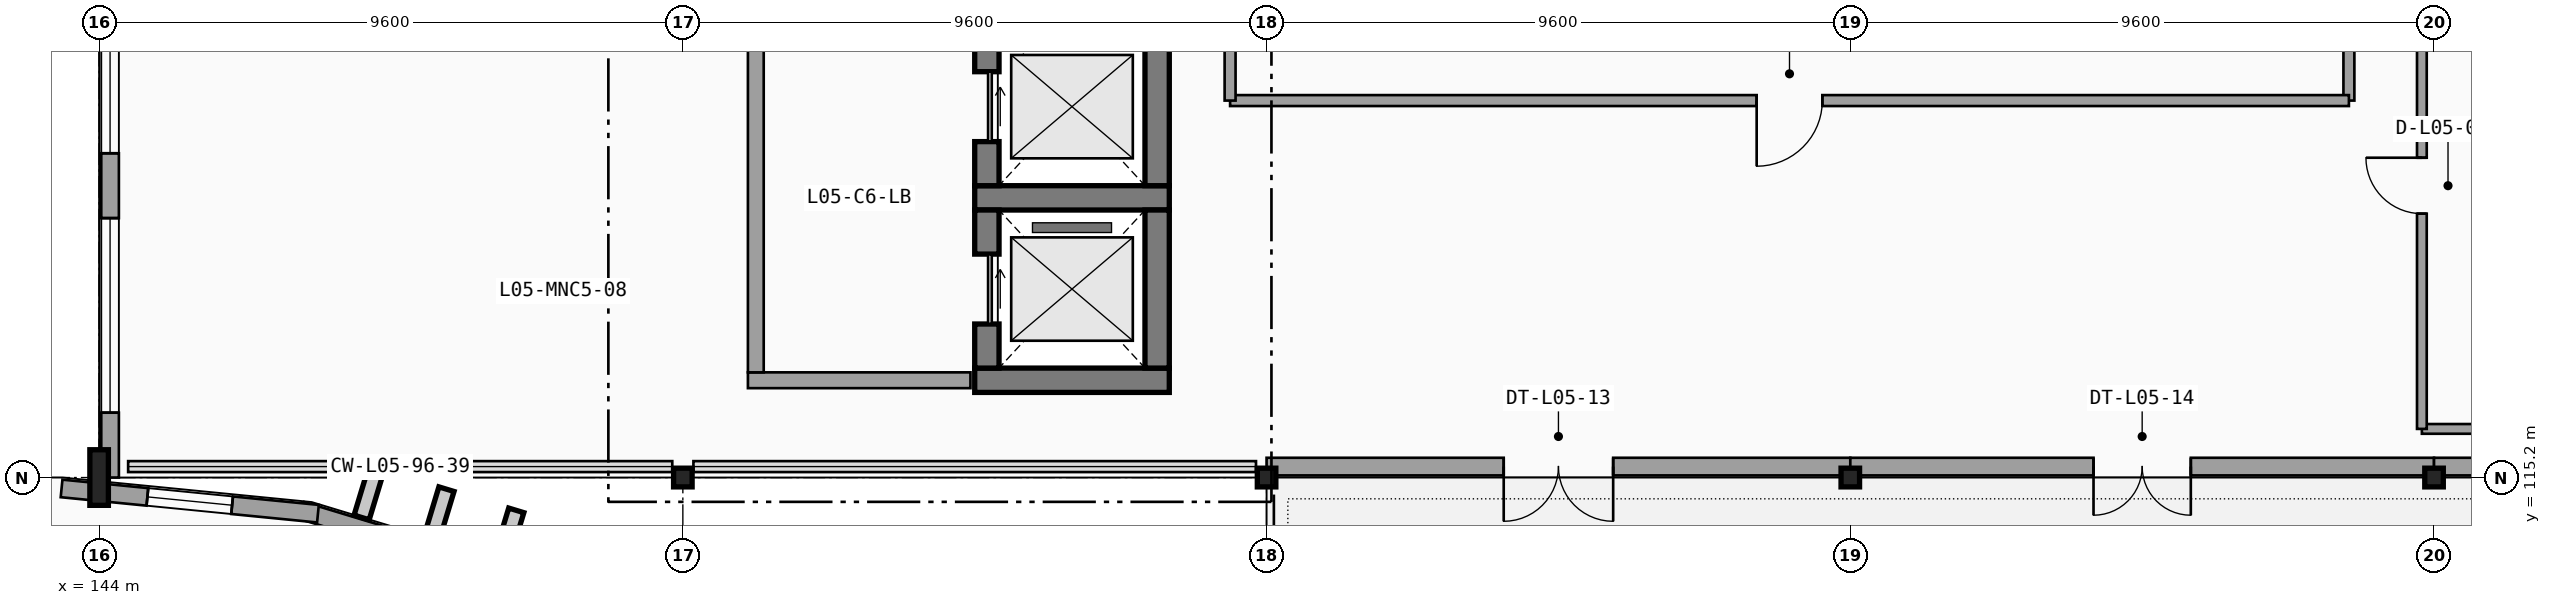
"""IFC4 building model, lengths in metres.
Left out: names, types, materials, properties, quantities, classifications, styles, units other than length and angle.
Written with IfcOpenShell. Run it as: python <this file> out.ifc"""

import sys

from ifc_helpers import new_model, si_unit, direction, frame, frame_2d, origin, origin_2d, place, context, subcontext, project, spatial, rectangle, i_section, extrude, element, fill, save


model = new_model("IFC4")
c1 = context("Model", 3, precision=1e-05, world=origin(), true_north=direction((0.0, 1.0)))
c2 = subcontext(c1, "Body", "Model", "MODEL_VIEW")
j1 = project(units=[si_unit("LENGTHUNIT", "METRE"), si_unit("PLANEANGLEUNIT", "RADIAN")], contexts=[c1])
p1 = place(None, origin())
s1 = spatial("IfcSite", under=j1, at=p1, CompositionType="ELEMENT")
p2 = place(p1, origin())
s2 = spatial("IfcBuilding", under=s1, at=p2, CompositionType="ELEMENT")
p3 = place(p2, frame((0.0, 0.0, 23.1)))
s3 = spatial("IfcBuildingStorey", under=s2, at=p3, CompositionType="ELEMENT", Elevation=23.1)
p4 = place(p3, frame((144.0, 115.2, 0.0), z_axis=(0.0, 0.0, 1.0), x_axis=(1.0, 0.0, 0.0)))
e1 = element("IfcColumn", 1, at=p4, inside=s3, PredefinedType="COLUMN", context=c2, shape_type="SweptSolid", body=[
    extrude(i_section(OverallWidth=0.305, OverallDepth=0.914, WebThickness=0.017, FlangeThickness=0.026, FilletRadius=0.02, at=origin_2d()), origin(), (0.0, 0.0, 1.0), 5.1),
])
for number, where, z_axis, x_axis in (
    (2, (153.6, 115.2, 0.0), (0.0, 0.0, 1.0), (1.0, 0.0, 0.0)),
    (3, (163.2, 115.2, 0.0), (0.0, 0.0, 1.0), (1.0, 0.0, 0.0)),
    (4, (172.8, 115.2, 0.0), (0.0, 0.0, 1.0), (1.0, 0.0, 0.0)),
    (5, (182.4, 115.2, 0.0), (0.0, 0.0, 1.0), (1.0, 0.0, 0.0)),
):
    element("IfcColumn", number, at=place(p3, frame(where, z_axis=z_axis, x_axis=x_axis)), inside=s3, PredefinedType="COLUMN", context=c2, shape_type="SweptSolid", body=[
        extrude(i_section(OverallWidth=0.305, OverallDepth=0.308, WebThickness=0.01, FlangeThickness=0.015, FilletRadius=0.013, at=origin_2d()), origin(), (0.0, 0.0, 1.0), 5.1),
    ])
p5 = place(p3, frame((144.18, 124.8, 0.0), z_axis=(0.0, 0.0, 1.0), x_axis=(0.0, -1.0, 0.0)))
e6 = element("IfcWall", 6, at=p5, inside=s3, PredefinedType="SOLIDWALL", context=c2, shape_type="SweptSolid", body=[
    extrude(rectangle(XDim=9.6, YDim=0.29, at=frame_2d((4.8, 0.0))), origin(), (0.0, 0.0, 1.0), 3.893),
])
p6 = place(p5, frame((4.267, 0.0, 0.95), z_axis=(0.0, 0.0, 1.0), x_axis=(-1.0, 0.0, 0.0)))
e7 = element("IfcOpeningElement", 7, at=p6, cuts=e6, PredefinedType="OPENING", context=c2, shape_type="SweptSolid", body=[
    extrude(rectangle(XDim=3.2, YDim=2.2, at=frame_2d((1.6, 1.1))), frame((0.0, 0.155, 0.0), z_axis=(0.0, -1.0, 0.0), x_axis=(1.0, 0.0, 0.0)), (0.0, 0.0, 1.0), 0.31),
])
p7 = place(p5, frame((8.533, 0.0, 0.95), z_axis=(0.0, 0.0, 1.0), x_axis=(-1.0, 0.0, 0.0)))
e8 = element("IfcOpeningElement", 8, at=p7, cuts=e6, PredefinedType="OPENING", context=c2, shape_type="SweptSolid", body=[
    extrude(rectangle(XDim=3.2, YDim=2.2, at=frame_2d((1.6, 1.1))), frame((0.0, 0.155, 0.0), z_axis=(0.0, -1.0, 0.0), x_axis=(1.0, 0.0, 0.0)), (0.0, 0.0, 1.0), 0.31),
])
p8 = place(p3, frame((163.2, 115.38, 0.0), z_axis=(0.0, 0.0, 1.0), x_axis=(1.0, 0.0, 0.0)))
e9 = element("IfcWall", 9, at=p8, inside=s3, PredefinedType="SOLIDWALL", context=c2, shape_type="SweptSolid", body=[
    extrude(rectangle(XDim=9.6, YDim=0.29, at=frame_2d((4.8, 0.0))), origin(), (0.0, 0.0, 1.0), 3.893),
])
p9 = place(p8, frame((5.7, 0.0, 0.0), z_axis=(0.0, 0.0, 1.0), x_axis=(-1.0, 0.0, 0.0)))
e10 = element("IfcOpeningElement", 10, at=p9, cuts=e9, PredefinedType="OPENING", context=c2, shape_type="SweptSolid", body=[
    extrude(rectangle(XDim=1.8, YDim=2.3, at=frame_2d((0.9, 1.15))), frame((0.0, 0.155, 0.0), z_axis=(0.0, -1.0, 0.0), x_axis=(1.0, 0.0, 0.0)), (0.0, 0.0, 1.0), 0.31),
])
p10 = place(p3, frame((172.8, 115.38, 0.0), z_axis=(0.0, 0.0, 1.0), x_axis=(1.0, 0.0, 0.0)))
e11 = element("IfcWall", 11, at=p10, inside=s3, PredefinedType="SOLIDWALL", context=c2, shape_type="SweptSolid", body=[
    extrude(rectangle(XDim=9.6, YDim=0.29, at=frame_2d((4.8, 0.0))), origin(), (0.0, 0.0, 1.0), 3.893),
])
p11 = place(p10, frame((5.6, 0.0, 0.0), z_axis=(0.0, 0.0, 1.0), x_axis=(-1.0, 0.0, 0.0)))
e12 = element("IfcOpeningElement", 12, at=p11, cuts=e11, PredefinedType="OPENING", context=c2, shape_type="SweptSolid", body=[
    extrude(rectangle(XDim=1.6, YDim=2.25, at=frame_2d((0.8, 1.125))), frame((0.0, 0.155, 0.0), z_axis=(0.0, -1.0, 0.0), x_axis=(1.0, 0.0, 0.0)), (0.0, 0.0, 1.0), 0.31),
])
p12 = place(p3, frame((182.4, 115.38, 0.0), z_axis=(0.0, 0.0, 1.0), x_axis=(1.0, 0.0, 0.0)))
e13 = element("IfcWall", 13, at=p12, inside=s3, PredefinedType="SOLIDWALL", context=c2, shape_type="SweptSolid", body=[
    extrude(rectangle(XDim=9.6, YDim=0.29, at=frame_2d((4.8, 0.0))), origin(), (0.0, 0.0, 1.0), 3.893),
])
p13 = place(p12, frame((4.267, 0.0, 0.95), z_axis=(0.0, 0.0, 1.0), x_axis=(-1.0, 0.0, 0.0)))
e14 = element("IfcOpeningElement", 14, at=p13, cuts=e13, PredefinedType="OPENING", context=c2, shape_type="SweptSolid", body=[
    extrude(rectangle(XDim=3.2, YDim=2.2, at=frame_2d((1.6, 1.1))), frame((0.0, 0.155, 0.0), z_axis=(0.0, -1.0, 0.0), x_axis=(1.0, 0.0, 0.0)), (0.0, 0.0, 1.0), 0.31),
])
p14 = place(p12, frame((8.533, 0.0, 0.95), z_axis=(0.0, 0.0, 1.0), x_axis=(-1.0, 0.0, 0.0)))
e15 = element("IfcOpeningElement", 15, at=p14, cuts=e13, PredefinedType="OPENING", context=c2, shape_type="SweptSolid", body=[
    extrude(rectangle(XDim=3.2, YDim=2.2, at=frame_2d((1.6, 1.1))), frame((0.0, 0.155, 0.0), z_axis=(0.0, -1.0, 0.0), x_axis=(1.0, 0.0, 0.0)), (0.0, 0.0, 1.0), 0.31),
])
p15 = place(p3, frame((151.499, 113.394, 0.0), z_axis=(0.0, 0.0, 1.0), x_axis=(-0.956928680947, 0.290323095156, 0.0)))
e16 = element("IfcWall", 16, at=p15, inside=s3, PredefinedType="SOLIDWALL", context=c2, shape_type="SweptSolid", body=[
    extrude(rectangle(XDim=4.357, YDim=0.29, at=frame_2d((2.178, 0.0))), origin(), (0.0, 0.0, 1.0), 4.82),
])
p16 = place(p15, frame((2.878, 0.0, 1.0), z_axis=(0.0, 0.0, 1.0), x_axis=(-1.0, 0.0, 0.0)))
e17 = element("IfcOpeningElement", 17, at=p16, cuts=e16, PredefinedType="OPENING", context=c2, shape_type="SweptSolid", body=[
    extrude(rectangle(XDim=1.4, YDim=1.8, at=frame_2d((0.7, 0.9))), frame((0.0, 0.155, 0.0), z_axis=(0.0, -1.0, 0.0), x_axis=(1.0, 0.0, 0.0)), (0.0, 0.0, 1.0), 0.31),
])
p17 = place(p3, frame((147.599, 114.606, 0.0), z_axis=(0.0, 0.0, 1.0), x_axis=(-0.995184426144, 0.098020191596, 0.0)))
e18 = element("IfcWall", 18, at=p17, inside=s3, PredefinedType="SOLIDWALL", context=c2, shape_type="SweptSolid", body=[
    extrude(rectangle(XDim=4.237, YDim=0.29, at=frame_2d((2.118, 0.0))), origin(), (0.0, 0.0, 1.0), 3.893),
])
p18 = place(p17, frame((2.818, 0.0, 1.0), z_axis=(0.0, 0.0, 1.0), x_axis=(-1.0, 0.0, 0.0)))
e19 = element("IfcOpeningElement", 19, at=p18, cuts=e18, PredefinedType="OPENING", context=c2, shape_type="SweptSolid", body=[
    extrude(rectangle(XDim=1.4, YDim=1.8, at=frame_2d((0.7, 0.9))), frame((0.0, 0.155, 0.0), z_axis=(0.0, -1.0, 0.0), x_axis=(1.0, 0.0, 0.0)), (0.0, 0.0, 1.0), 0.31),
])
for number, where, z_axis, x_axis in (
    (20, (158.4, 116.8, 0.0), (0.0, 0.0, 1.0), (1.0, 0.0, 0.0)),
    (21, (161.6, 119.8, 0.0), (0.0, 0.0, 1.0), (-1.0, 0.0, 0.0)),
):
    element("IfcWall", number, at=place(p3, frame(where, z_axis=z_axis, x_axis=x_axis)), inside=s3, PredefinedType="SHEAR", context=c2, shape_type="SweptSolid", body=[
        extrude(rectangle(XDim=3.2, YDim=0.4, at=frame_2d((1.6, 0.0))), origin(), (0.0, 0.0, 1.0), 4.82),
    ])
p19 = place(p3, frame((158.6, 119.6, 0.0), z_axis=(0.0, 0.0, 1.0), x_axis=(0.0, -1.0, 0.0)))
e22 = element("IfcWall", 22, at=p19, inside=s3, PredefinedType="SHEAR", context=c2, shape_type="SweptSolid", body=[
    extrude(rectangle(XDim=2.6, YDim=0.4, at=frame_2d((1.3, 0.0))), origin(), (0.0, 0.0, 1.0), 4.82),
])
p20 = place(p19, frame((0.725, 0.0, 0.0), z_axis=(0.0, 0.0, 1.0), x_axis=(1.0, 0.0, 0.0)))
e23 = element("IfcOpeningElement", 23, at=p20, cuts=e22, PredefinedType="OPENING", context=c2, shape_type="SweptSolid", body=[
    extrude(rectangle(XDim=1.15, YDim=2.2, at=frame_2d((0.575, 1.1))), frame((0.0, 0.21, 0.0), z_axis=(0.0, -1.0, 0.0), x_axis=(1.0, 0.0, 0.0)), (0.0, 0.0, 1.0), 0.42),
])
p21 = place(p3, frame((161.4, 117.0, 0.0), z_axis=(0.0, 0.0, 1.0), x_axis=(0.0, 1.0, 0.0)))
e24 = element("IfcWall", 24, at=p21, inside=s3, PredefinedType="SHEAR", context=c2, shape_type="SweptSolid", body=[
    extrude(rectangle(XDim=2.6, YDim=0.4, at=frame_2d((1.3, 0.0))), origin(), (0.0, 0.0, 1.0), 4.82),
])
p22 = place(p3, frame((158.6, 122.6, 0.0), z_axis=(0.0, 0.0, 1.0), x_axis=(0.0, -1.0, 0.0)))
e25 = element("IfcWall", 25, at=p22, inside=s3, PredefinedType="SHEAR", context=c2, shape_type="SweptSolid", body=[
    extrude(rectangle(XDim=2.6, YDim=0.4, at=frame_2d((1.3, 0.0))), origin(), (0.0, 0.0, 1.0), 4.82),
])
p23 = place(p22, frame((0.725, 0.0, 0.0), z_axis=(0.0, 0.0, 1.0), x_axis=(1.0, 0.0, 0.0)))
e26 = element("IfcOpeningElement", 26, at=p23, cuts=e25, PredefinedType="OPENING", context=c2, shape_type="SweptSolid", body=[
    extrude(rectangle(XDim=1.15, YDim=2.2, at=frame_2d((0.575, 1.1))), frame((0.0, 0.21, 0.0), z_axis=(0.0, -1.0, 0.0), x_axis=(1.0, 0.0, 0.0)), (0.0, 0.0, 1.0), 0.42),
])
p24 = place(p3, frame((161.4, 120.0, 0.0), z_axis=(0.0, 0.0, 1.0), x_axis=(0.0, 1.0, 0.0)))
e27 = element("IfcWall", 27, at=p24, inside=s3, PredefinedType="SHEAR", context=c2, shape_type="SweptSolid", body=[
    extrude(rectangle(XDim=2.6, YDim=0.4, at=frame_2d((1.3, 0.0))), origin(), (0.0, 0.0, 1.0), 4.82),
])
p25 = place(p3, frame((154.67, 116.8, 0.0), z_axis=(0.0, 0.0, 1.0), x_axis=(1.0, 0.0, 0.0)))
e28 = element("IfcWall", 28, at=p25, inside=s3, PredefinedType="SOLIDWALL", context=c2, shape_type="SweptSolid", body=[
    extrude(rectangle(XDim=3.66, YDim=0.26, at=frame_2d((1.83, 0.0))), origin(), (0.0, 0.0, 1.0), 4.82),
])
p26 = place(p3, frame((154.8, 123.27, 0.0), z_axis=(0.0, 0.0, 1.0), x_axis=(0.0, -1.0, 0.0)))
e29 = element("IfcWall", 29, at=p26, inside=s3, PredefinedType="SOLIDWALL", context=c2, shape_type="SweptSolid", body=[
    extrude(rectangle(XDim=6.34, YDim=0.26, at=frame_2d((3.17, 0.0))), origin(), (0.0, 0.0, 1.0), 4.82),
])
p27 = place(p3, frame((181.0, 133.8, 0.0), z_axis=(0.0, 0.0, 1.0), x_axis=(0.0, -1.0, 0.0)))
e30 = element("IfcWall", 30, at=p27, inside=s3, PredefinedType="PARTITIONING", context=c2, shape_type="SweptSolid", body=[
    extrude(rectangle(XDim=12.4, YDim=0.18, at=frame_2d((6.2, 0.0))), origin(), (0.0, 0.0, 1.0), 3.906),
])
p28 = place(p3, frame((181.0, 121.4, 0.0), z_axis=(0.0, 0.0, 1.0), x_axis=(-1.0, 0.0, 0.0)))
e31 = element("IfcWall", 31, at=p28, inside=s3, PredefinedType="PARTITIONING", context=c2, shape_type="SweptSolid", body=[
    extrude(rectangle(XDim=18.4, YDim=0.18, at=frame_2d((9.2, 0.0))), origin(), (0.0, 0.0, 1.0), 3.893),
])
p29 = place(p28, frame((8.66, 0.0, 0.0), z_axis=(0.0, 0.0, 1.0), x_axis=(1.0, 0.0, 0.0)))
e32 = element("IfcOpeningElement", 32, at=p29, cuts=e31, PredefinedType="OPENING", context=c2, shape_type="SweptSolid", body=[
    extrude(rectangle(XDim=1.08, YDim=2.22, at=frame_2d((0.54, 1.11))), frame((0.0, 0.1, 0.0), z_axis=(0.0, -1.0, 0.0), x_axis=(1.0, 0.0, 0.0)), (0.0, 0.0, 1.0), 0.2),
])
p30 = place(p3, frame((162.6, 121.4, 0.0), z_axis=(0.0, 0.0, 1.0), x_axis=(0.0, 1.0, 0.0)))
e33 = element("IfcWall", 33, at=p30, inside=s3, PredefinedType="PARTITIONING", context=c2, shape_type="SweptSolid", body=[
    extrude(rectangle(XDim=12.4, YDim=0.18, at=frame_2d((6.2, 0.0))), origin(), (0.0, 0.0, 1.0), 3.906),
])
p31 = place(p3, frame((191.5, 116.0, 0.0), z_axis=(0.0, 0.0, 1.0), x_axis=(-1.0, 0.0, 0.0)))
e34 = element("IfcWall", 34, at=p31, inside=s3, PredefinedType="PARTITIONING", context=c2, shape_type="SweptSolid", body=[
    extrude(rectangle(XDim=9.3, YDim=0.16, at=frame_2d((4.65, 0.0))), origin(), (0.0, 0.0, 1.0), 3.906),
])
p32 = place(p3, frame((182.2, 116.0, 0.0), z_axis=(0.0, 0.0, 1.0), x_axis=(0.0, 1.0, 0.0)))
e35 = element("IfcWall", 35, at=p32, inside=s3, PredefinedType="PARTITIONING", context=c2, shape_type="SweptSolid", body=[
    extrude(rectangle(XDim=8.8, YDim=0.16, at=frame_2d((4.4, 0.0))), origin(), (0.0, 0.0, 1.0), 3.906),
])
p33 = place(p32, frame((3.54, 0.0, 0.0), z_axis=(0.0, 0.0, 1.0), x_axis=(1.0, 0.0, 0.0)))
e36 = element("IfcOpeningElement", 36, at=p33, cuts=e35, PredefinedType="OPENING", context=c2, shape_type="SweptSolid", body=[
    extrude(rectangle(XDim=0.92, YDim=2.12, at=frame_2d((0.46, 1.06))), frame((0.0, 0.09, 0.0), z_axis=(0.0, -1.0, 0.0), x_axis=(1.0, 0.0, 0.0)), (0.0, 0.0, 1.0), 0.18),
])
p34 = place(p6, origin())
e37 = element("IfcWindow", 37, at=p34, inside=s3, PartitioningType="SINGLE_PANEL", PredefinedType="WINDOW", context=c2, shape_type="SweptSolid", body=[
    extrude(rectangle(XDim=3.2, YDim=2.2, at=frame_2d((1.6, 1.1))), frame((0.0, 0.03, 0.0), z_axis=(0.0, -1.0, 0.0), x_axis=(1.0, 0.0, 0.0)), (0.0, 0.0, 1.0), 0.06),
])
fill(e7, e37)
p35 = place(p7, origin())
e38 = element("IfcWindow", 38, at=p35, inside=s3, PartitioningType="SINGLE_PANEL", PredefinedType="WINDOW", context=c2, shape_type="SweptSolid", body=[
    extrude(rectangle(XDim=3.2, YDim=2.2, at=frame_2d((1.6, 1.1))), frame((0.0, 0.03, 0.0), z_axis=(0.0, -1.0, 0.0), x_axis=(1.0, 0.0, 0.0)), (0.0, 0.0, 1.0), 0.06),
])
fill(e8, e38)
p36 = place(p9, origin())
e39 = element("IfcDoor", 39, at=p36, inside=s3, OperationType="DOUBLE_DOOR_SINGLE_SWING", PredefinedType="DOOR", context=c2, shape_type="SweptSolid", body=[
    extrude(rectangle(XDim=1.8, YDim=2.3, at=frame_2d((0.9, 1.15))), frame((0.0, 0.025, 0.0), z_axis=(0.0, -1.0, 0.0), x_axis=(1.0, 0.0, 0.0)), (0.0, 0.0, 1.0), 0.05),
])
fill(e10, e39)
p37 = place(p11, origin())
e40 = element("IfcDoor", 40, at=p37, inside=s3, OperationType="DOUBLE_DOOR_SINGLE_SWING", PredefinedType="DOOR", context=c2, shape_type="SweptSolid", body=[
    extrude(rectangle(XDim=1.6, YDim=2.25, at=frame_2d((0.8, 1.125))), frame((0.0, 0.025, 0.0), z_axis=(0.0, -1.0, 0.0), x_axis=(1.0, 0.0, 0.0)), (0.0, 0.0, 1.0), 0.05),
])
fill(e12, e40)
p38 = place(p18, origin())
e41 = element("IfcWindow", 41, at=p38, inside=s3, PartitioningType="SINGLE_PANEL", PredefinedType="WINDOW", context=c2, shape_type="SweptSolid", body=[
    extrude(rectangle(XDim=1.4, YDim=1.8, at=frame_2d((0.7, 0.9))), frame((0.0, 0.03, 0.0), z_axis=(0.0, -1.0, 0.0), x_axis=(1.0, 0.0, 0.0)), (0.0, 0.0, 1.0), 0.06),
])
fill(e19, e41)
p39 = place(p20, origin())
e42 = element("IfcDoor", 42, at=p39, inside=s3, OperationType="SLIDING_TO_LEFT", PredefinedType="DOOR", context=c2, shape_type="SweptSolid", body=[
    extrude(rectangle(XDim=1.15, YDim=2.2, at=frame_2d((0.575, 1.1))), frame((0.0, 0.025, 0.0), z_axis=(0.0, -1.0, 0.0), x_axis=(1.0, 0.0, 0.0)), (0.0, 0.0, 1.0), 0.05),
])
fill(e23, e42)
p40 = place(p23, origin())
e43 = element("IfcDoor", 43, at=p40, inside=s3, OperationType="SLIDING_TO_LEFT", PredefinedType="DOOR", context=c2, shape_type="SweptSolid", body=[
    extrude(rectangle(XDim=1.15, YDim=2.2, at=frame_2d((0.575, 1.1))), frame((0.0, 0.025, 0.0), z_axis=(0.0, -1.0, 0.0), x_axis=(1.0, 0.0, 0.0)), (0.0, 0.0, 1.0), 0.05),
])
fill(e26, e43)
p41 = place(p29, origin())
e44 = element("IfcDoor", 44, at=p41, inside=s3, OperationType="SINGLE_SWING_RIGHT", PredefinedType="DOOR", context=c2, shape_type="SweptSolid", body=[
    extrude(rectangle(XDim=1.08, YDim=2.22, at=frame_2d((0.54, 1.11))), frame((0.0, 0.025, 0.0), z_axis=(0.0, -1.0, 0.0), x_axis=(1.0, 0.0, 0.0)), (0.0, 0.0, 1.0), 0.05),
])
fill(e32, e44)
p42 = place(p33, origin())
e45 = element("IfcDoor", 45, at=p42, inside=s3, OperationType="SINGLE_SWING_RIGHT", PredefinedType="DOOR", context=c2, shape_type="SweptSolid", body=[
    extrude(rectangle(XDim=0.92, YDim=2.12, at=frame_2d((0.46, 1.06))), frame((0.0, 0.025, 0.0), z_axis=(0.0, -1.0, 0.0), x_axis=(1.0, 0.0, 0.0)), (0.0, 0.0, 1.0), 0.05),
])
fill(e36, e45)
save(model, sys.argv[1])
